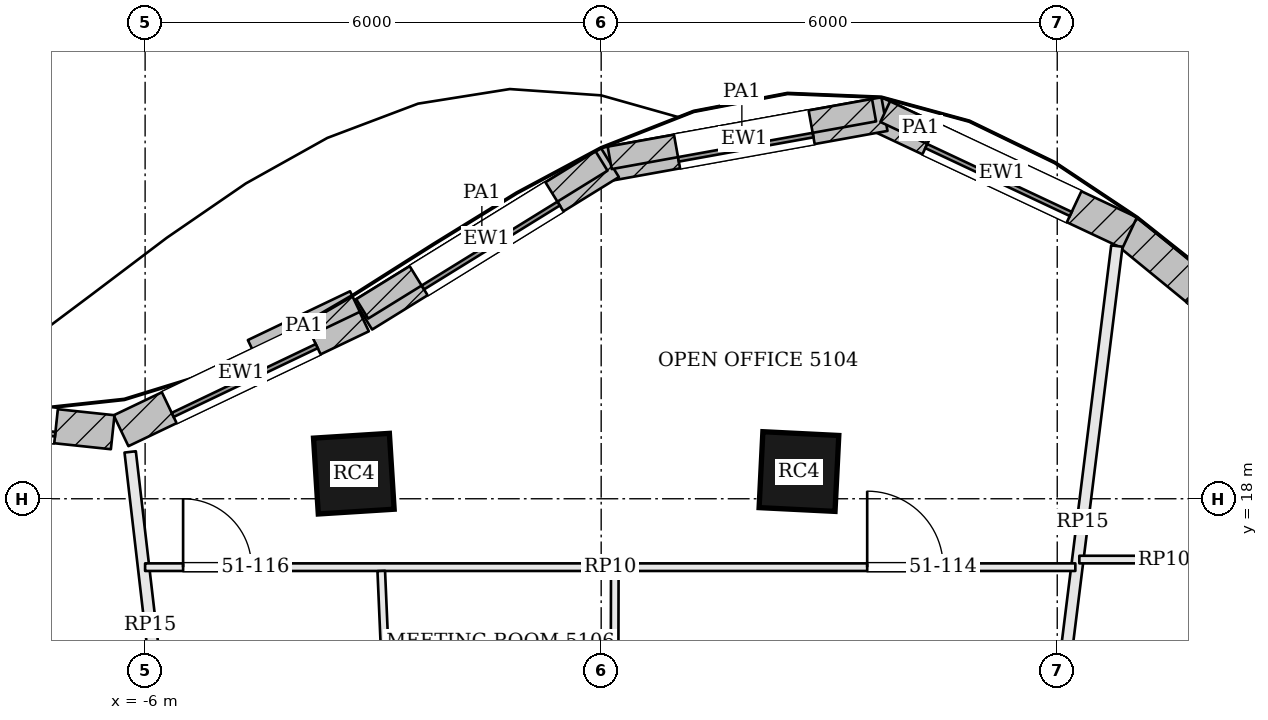
"""IFC4 building model, lengths in metres.
Left out: names, types, materials, properties, quantities, classifications, styles, units other than length and angle.
Written with IfcOpenShell. Run it as: python <this file> out.ifc"""

import sys

from ifc_helpers import new_model, si_unit, direction, frame, frame_2d, origin, origin_2d, place, context, subcontext, project, spatial, rectangle, extrude, element, fill, save


model = new_model("IFC4")
c1 = context("Model", 3, precision=1e-05, world=origin(), true_north=direction((0.0, 1.0)))
c2 = subcontext(c1, "Body", "Model", "MODEL_VIEW")
j1 = project(units=[si_unit("LENGTHUNIT", "METRE"), si_unit("PLANEANGLEUNIT", "RADIAN")], contexts=[c1])
p1 = place(None, origin())
s1 = spatial("IfcSite", under=j1, at=p1, CompositionType="ELEMENT")
p2 = place(p1, origin())
s2 = spatial("IfcBuilding", under=s1, at=p2, CompositionType="ELEMENT")
p3 = place(p2, frame((0.0, 0.0, 209.1)))
s3 = spatial("IfcBuildingStorey", under=s2, at=p3, CompositionType="ELEMENT", Elevation=209.1)
for number, where, z_axis, x_axis in (
    (1, (2.602, 18.358, 0.0), (0.0, 0.0, 1.0), (-0.999, 0.05, 0.0)),
    (2, (-3.254, 18.33, 0.0), (0.0, 0.0, 1.0), (-0.998, -0.063, 0.0)),
):
    element("IfcColumn", number, at=place(p3, frame(where, z_axis=z_axis, x_axis=x_axis)), inside=s3, PredefinedType="COLUMN", context=c2, shape_type="SweptSolid", body=[
        extrude(rectangle(XDim=1.0, YDim=1.0, at=origin_2d()), origin(), (0.0, 0.0, 1.0), 3.9),
    ])
p4 = place(p3, frame((10.407, 18.661, 0.0), z_axis=(0.0, 0.0, 1.0), x_axis=(-0.773702458947, 0.633549133864, 0.0)))
e3 = element("IfcWall", 3, at=p4, inside=s3, PredefinedType="SOLIDWALL", context=c2, shape_type="SweptSolid", body=[
    extrude(rectangle(XDim=4.526, YDim=0.45, at=frame_2d((2.263, 0.0))), origin(), (0.0, 0.0, 1.0), 3.7),
])
p5 = place(p4, frame((1.213, 0.0, 0.9)))
e4 = element("IfcOpeningElement", 4, at=p5, cuts=e3, PredefinedType="OPENING", context=c2, shape_type="SweptSolid", body=[
    extrude(rectangle(XDim=2.1, YDim=2.3, at=frame_2d((1.05, 1.15))), frame((0.0, 0.235, 0.0), z_axis=(0.0, -1.0, 0.0), x_axis=(1.0, 0.0, 0.0)), (0.0, 0.0, 1.0), 0.47),
])
p6 = place(p3, frame((6.953, 21.499, 0.0), z_axis=(0.0, 0.0, 1.0), x_axis=(-0.905034581957, 0.425337989676, 0.0)))
e5 = element("IfcWall", 5, at=p6, inside=s3, PredefinedType="SOLIDWALL", context=c2, shape_type="SweptSolid", body=[
    extrude(rectangle(XDim=3.714, YDim=0.45, at=frame_2d((1.857, 0.0))), origin(), (0.0, 0.0, 1.0), 3.7),
])
p7 = place(p6, frame((0.807, 0.0, 0.9)))
e6 = element("IfcOpeningElement", 6, at=p7, cuts=e5, PredefinedType="OPENING", context=c2, shape_type="SweptSolid", body=[
    extrude(rectangle(XDim=2.1, YDim=2.3, at=frame_2d((1.05, 1.15))), frame((0.0, 0.235, 0.0), z_axis=(0.0, -1.0, 0.0), x_axis=(1.0, 0.0, 0.0)), (0.0, 0.0, 1.0), 0.47),
])
p8 = place(p3, frame((3.727, 23.061, 0.0), z_axis=(0.0, 0.0, 1.0), x_axis=(-0.984119180424, -0.177508982087, 0.0)))
e7 = element("IfcWall", 7, at=p8, inside=s3, PredefinedType="SOLIDWALL", context=c2, shape_type="SweptSolid", body=[
    extrude(rectangle(XDim=3.747, YDim=0.45, at=frame_2d((1.873, 0.0))), origin(), (0.0, 0.0, 1.0), 3.7),
])
p9 = place(p8, frame((0.973, 0.0, 0.9)))
e8 = element("IfcOpeningElement", 8, at=p9, cuts=e7, PredefinedType="OPENING", context=c2, shape_type="SweptSolid", body=[
    extrude(rectangle(XDim=1.8, YDim=2.3, at=frame_2d((0.9, 1.15))), frame((0.0, 0.235, 0.0), z_axis=(0.0, -1.0, 0.0), x_axis=(1.0, 0.0, 0.0)), (0.0, 0.0, 1.0), 0.47),
])
p10 = place(p3, frame((0.115, 22.424, 0.0), z_axis=(0.0, 0.0, 1.0), x_axis=(-0.8506970368, -0.525656305564, 0.0)))
e9 = element("IfcWall", 9, at=p10, inside=s3, PredefinedType="SOLIDWALL", context=c2, shape_type="SweptSolid", body=[
    extrude(rectangle(XDim=3.816, YDim=0.45, at=frame_2d((1.908, 0.0))), origin(), (0.0, 0.0, 1.0), 3.7),
])
p11 = place(p10, frame((0.858, 0.0, 0.9)))
e10 = element("IfcOpeningElement", 10, at=p11, cuts=e9, PredefinedType="OPENING", context=c2, shape_type="SweptSolid", body=[
    extrude(rectangle(XDim=2.1, YDim=2.3, at=frame_2d((1.05, 1.15))), frame((0.0, 0.235, 0.0), z_axis=(0.0, -1.0, 0.0), x_axis=(1.0, 0.0, 0.0)), (0.0, 0.0, 1.0), 0.47),
])
p12 = place(p3, frame((-3.154, 20.406, 0.0), z_axis=(0.0, 0.0, 1.0), x_axis=(-0.902333313, -0.431038968367, 0.0)))
e11 = element("IfcWall", 11, at=p12, inside=s3, PredefinedType="SOLIDWALL", context=c2, shape_type="SweptSolid", body=[
    extrude(rectangle(XDim=3.505, YDim=0.45, at=frame_2d((1.753, 0.0))), origin(), (0.0, 0.0, 1.0), 3.7),
])
p13 = place(p12, frame((0.703, 0.0, 0.9)))
e12 = element("IfcOpeningElement", 12, at=p13, cuts=e11, PredefinedType="OPENING", context=c2, shape_type="SweptSolid", body=[
    extrude(rectangle(XDim=2.1, YDim=2.3, at=frame_2d((1.05, 1.15))), frame((0.0, 0.235, 0.0), z_axis=(0.0, -1.0, 0.0), x_axis=(1.0, 0.0, 0.0)), (0.0, 0.0, 1.0), 0.47),
])
p14 = place(p3, frame((-6.427, 18.875, 0.0), z_axis=(0.0, 0.0, 1.0), x_axis=(-0.994433468803, 0.10536638992, 0.0)))
e13 = element("IfcWall", 13, at=p14, inside=s3, PredefinedType="SOLIDWALL", context=c2, shape_type="SweptSolid", body=[
    extrude(rectangle(XDim=3.598, YDim=0.45, at=frame_2d((1.799, 0.0))), origin(), (0.0, 0.0, 1.0), 3.7),
])
p15 = place(p14, frame((0.749, 0.0, 0.9)))
e14 = element("IfcOpeningElement", 14, at=p15, cuts=e13, PredefinedType="OPENING", context=c2, shape_type="SweptSolid", body=[
    extrude(rectangle(XDim=2.1, YDim=2.3, at=frame_2d((1.05, 1.15))), frame((0.0, 0.235, 0.0), z_axis=(0.0, -1.0, 0.0), x_axis=(1.0, 0.0, 0.0)), (0.0, 0.0, 1.0), 0.47),
])
p16 = place(p3, frame((4.667, 22.656, 3.9), z_axis=(0.0, 0.0, 1.0), x_axis=(-0.905050240273, 0.425304670304, 0.0)))
e15 = element("IfcWall", 15, at=p16, inside=s3, PredefinedType="PARAPET", context=c2, shape_type="SweptSolid", body=[
    extrude(rectangle(XDim=1.027, YDim=0.3, at=frame_2d((0.513, 0.0))), origin(), (0.0, 0.0, 1.0), 1.1),
])
p17 = place(p3, frame((3.59, 23.112, 3.9), z_axis=(0.0, 0.0, 1.0), x_axis=(-0.984124248147, -0.177480884064, 0.0)))
e16 = element("IfcWall", 16, at=p17, inside=s3, PredefinedType="PARAPET", context=c2, shape_type="SweptSolid", body=[
    extrude(rectangle(XDim=3.534, YDim=0.3, at=frame_2d((1.767, 0.0))), origin(), (0.0, 0.0, 1.0), 1.1),
])
p18 = place(p3, frame((0.005, 22.444, 3.9), z_axis=(0.0, 0.0, 1.0), x_axis=(-0.850710394144, -0.525634688063, 0.0)))
e17 = element("IfcWall", 17, at=p18, inside=s3, PredefinedType="PARAPET", context=c2, shape_type="SweptSolid", body=[
    extrude(rectangle(XDim=3.702, YDim=0.3, at=frame_2d((1.851, 0.0))), origin(), (0.0, 0.0, 1.0), 1.1),
])
p19 = place(p3, frame((-3.239, 20.594, 3.9), z_axis=(0.0, 0.0, 1.0), x_axis=(-0.902344893923, -0.431014724123, 0.0)))
e18 = element("IfcWall", 18, at=p19, inside=s3, PredefinedType="PARAPET", context=c2, shape_type="SweptSolid", body=[
    extrude(rectangle(XDim=1.49, YDim=0.3, at=frame_2d((0.745, 0.0))), origin(), (0.0, 0.0, 1.0), 1.1),
])
p20 = place(p3, frame((6.784, 21.325, 0.0), z_axis=(0.0, 0.0, 1.0), x_axis=(-0.123569990481, -0.992335859199, 0.0)))
e19 = element("IfcWall", 19, at=p20, inside=s3, PredefinedType="PARTITIONING", context=c2, shape_type="SweptSolid", body=[
    extrude(rectangle(XDim=7.306, YDim=0.15, at=frame_2d((3.653, 0.0))), origin(), (0.0, 0.0, 1.0), 3.084),
])
p21 = place(p3, frame((-6.197, 18.616, 0.0), z_axis=(0.0, 0.0, 1.0), x_axis=(0.11538201972, -0.993321191521, 0.0)))
e20 = element("IfcWall", 20, at=p21, inside=s3, PredefinedType="PARTITIONING", context=c2, shape_type="SweptSolid", body=[
    extrude(rectangle(XDim=4.573, YDim=0.15, at=frame_2d((2.286, 0.0))), origin(), (0.0, 0.0, 1.0), 3.084),
])
p22 = place(p3, frame((6.291, 17.2, 0.0), z_axis=(0.0, 0.0, 1.0), x_axis=(1.0, 0.0, 0.0)))
e21 = element("IfcWall", 21, at=p22, inside=s3, PredefinedType="PARTITIONING", context=c2, shape_type="SweptSolid", body=[
    extrude(rectangle(XDim=2.23, YDim=0.1, at=frame_2d((1.115, 0.0))), origin(), (0.0, 0.0, 1.0), 3.084),
])
p23 = place(p3, frame((-6.0, 17.1, 0.0), z_axis=(0.0, 0.0, 1.0), x_axis=(1.0, 0.0, 0.0)))
e22 = element("IfcWall", 22, at=p23, inside=s3, PredefinedType="PARTITIONING", context=c2, shape_type="SweptSolid", body=[
    extrude(rectangle(XDim=12.239, YDim=0.1, at=frame_2d((6.119, 0.0))), origin(), (0.0, 0.0, 1.0), 3.084),
])
p24 = place(p23, frame((9.5, 0.0, 0.0)))
e23 = element("IfcOpeningElement", 23, at=p24, cuts=e22, PredefinedType="OPENING", context=c2, shape_type="SweptSolid", body=[
    extrude(rectangle(XDim=1.0, YDim=2.1, at=frame_2d((0.5, 1.05))), frame((0.0, 0.06, 0.0), z_axis=(0.0, -1.0, 0.0), x_axis=(1.0, 0.0, 0.0)), (0.0, 0.0, 1.0), 0.12),
])
p25 = place(p23, frame((0.5, 0.0, 0.0)))
e24 = element("IfcOpeningElement", 24, at=p25, cuts=e22, PredefinedType="OPENING", context=c2, shape_type="SweptSolid", body=[
    extrude(rectangle(XDim=0.9, YDim=2.1, at=frame_2d((0.45, 1.05))), frame((0.0, 0.06, 0.0), z_axis=(0.0, -1.0, 0.0), x_axis=(1.0, 0.0, 0.0)), (0.0, 0.0, 1.0), 0.12),
])
p26 = place(p3, frame((0.173, 14.075, 0.0), z_axis=(0.0, 0.0, 1.0), x_axis=(0.002051530231, 0.99999789561, 0.0)))
e25 = element("IfcWall", 25, at=p26, inside=s3, PredefinedType="PARTITIONING", context=c2, shape_type="SweptSolid", body=[
    extrude(rectangle(XDim=2.975, YDim=0.1, at=frame_2d((1.488, 0.0))), origin(), (0.0, 0.0, 1.0), 3.084),
])
p27 = place(p3, frame((-2.765, 14.075, 0.0), z_axis=(0.0, 0.0, 1.0), x_axis=(-0.043124132096, 0.999069721907, 0.0)))
e26 = element("IfcWall", 26, at=p27, inside=s3, PredefinedType="PARTITIONING", context=c2, shape_type="SweptSolid", body=[
    extrude(rectangle(XDim=2.978, YDim=0.1, at=frame_2d((1.489, 0.0))), origin(), (0.0, 0.0, 1.0), 3.084),
])
p28 = place(p7, origin())
e27 = element("IfcWindow", 27, at=p28, inside=s3, PartitioningType="SINGLE_PANEL", PredefinedType="WINDOW", context=c2, shape_type="SweptSolid", body=[
    extrude(rectangle(XDim=2.1, YDim=2.3, at=frame_2d((1.05, 1.15))), frame((0.0, 0.135, 0.0), z_axis=(0.0, -1.0, 0.0), x_axis=(1.0, 0.0, 0.0)), (0.0, 0.0, 1.0), 0.06),
])
fill(e6, e27)
p29 = place(p9, origin())
e28 = element("IfcWindow", 28, at=p29, inside=s3, PartitioningType="SINGLE_PANEL", PredefinedType="WINDOW", context=c2, shape_type="SweptSolid", body=[
    extrude(rectangle(XDim=1.8, YDim=2.3, at=frame_2d((0.9, 1.15))), frame((0.0, 0.135, 0.0), z_axis=(0.0, -1.0, 0.0), x_axis=(1.0, 0.0, 0.0)), (0.0, 0.0, 1.0), 0.06),
])
fill(e8, e28)
p30 = place(p11, origin())
e29 = element("IfcWindow", 29, at=p30, inside=s3, PartitioningType="SINGLE_PANEL", PredefinedType="WINDOW", context=c2, shape_type="SweptSolid", body=[
    extrude(rectangle(XDim=2.1, YDim=2.3, at=frame_2d((1.05, 1.15))), frame((0.0, 0.135, 0.0), z_axis=(0.0, -1.0, 0.0), x_axis=(1.0, 0.0, 0.0)), (0.0, 0.0, 1.0), 0.06),
])
fill(e10, e29)
p31 = place(p13, origin())
e30 = element("IfcWindow", 30, at=p31, inside=s3, PartitioningType="SINGLE_PANEL", PredefinedType="WINDOW", context=c2, shape_type="SweptSolid", body=[
    extrude(rectangle(XDim=2.1, YDim=2.3, at=frame_2d((1.05, 1.15))), frame((0.0, 0.135, 0.0), z_axis=(0.0, -1.0, 0.0), x_axis=(1.0, 0.0, 0.0)), (0.0, 0.0, 1.0), 0.06),
])
fill(e12, e30)
p32 = place(p15, origin())
e31 = element("IfcWindow", 31, at=p32, inside=s3, PartitioningType="SINGLE_PANEL", PredefinedType="WINDOW", context=c2, shape_type="SweptSolid", body=[
    extrude(rectangle(XDim=2.1, YDim=2.3, at=frame_2d((1.05, 1.15))), frame((0.0, 0.135, 0.0), z_axis=(0.0, -1.0, 0.0), x_axis=(1.0, 0.0, 0.0)), (0.0, 0.0, 1.0), 0.06),
])
fill(e14, e31)
p33 = place(p24, origin())
e32 = element("IfcDoor", 32, at=p33, inside=s3, OperationType="SINGLE_SWING_LEFT", PredefinedType="DOOR", context=c2, shape_type="SweptSolid", body=[
    extrude(rectangle(XDim=1.0, YDim=2.1, at=frame_2d((0.5, 1.05))), frame((0.0, 0.025, 0.0), z_axis=(0.0, -1.0, 0.0), x_axis=(1.0, 0.0, 0.0)), (0.0, 0.0, 1.0), 0.05),
])
fill(e23, e32)
p34 = place(p25, origin())
e33 = element("IfcDoor", 33, at=p34, inside=s3, OperationType="SINGLE_SWING_LEFT", PredefinedType="DOOR", context=c2, shape_type="SweptSolid", body=[
    extrude(rectangle(XDim=0.9, YDim=2.1, at=frame_2d((0.45, 1.05))), frame((0.0, 0.025, 0.0), z_axis=(0.0, -1.0, 0.0), x_axis=(1.0, 0.0, 0.0)), (0.0, 0.0, 1.0), 0.05),
])
fill(e24, e33)
save(model, sys.argv[1])
